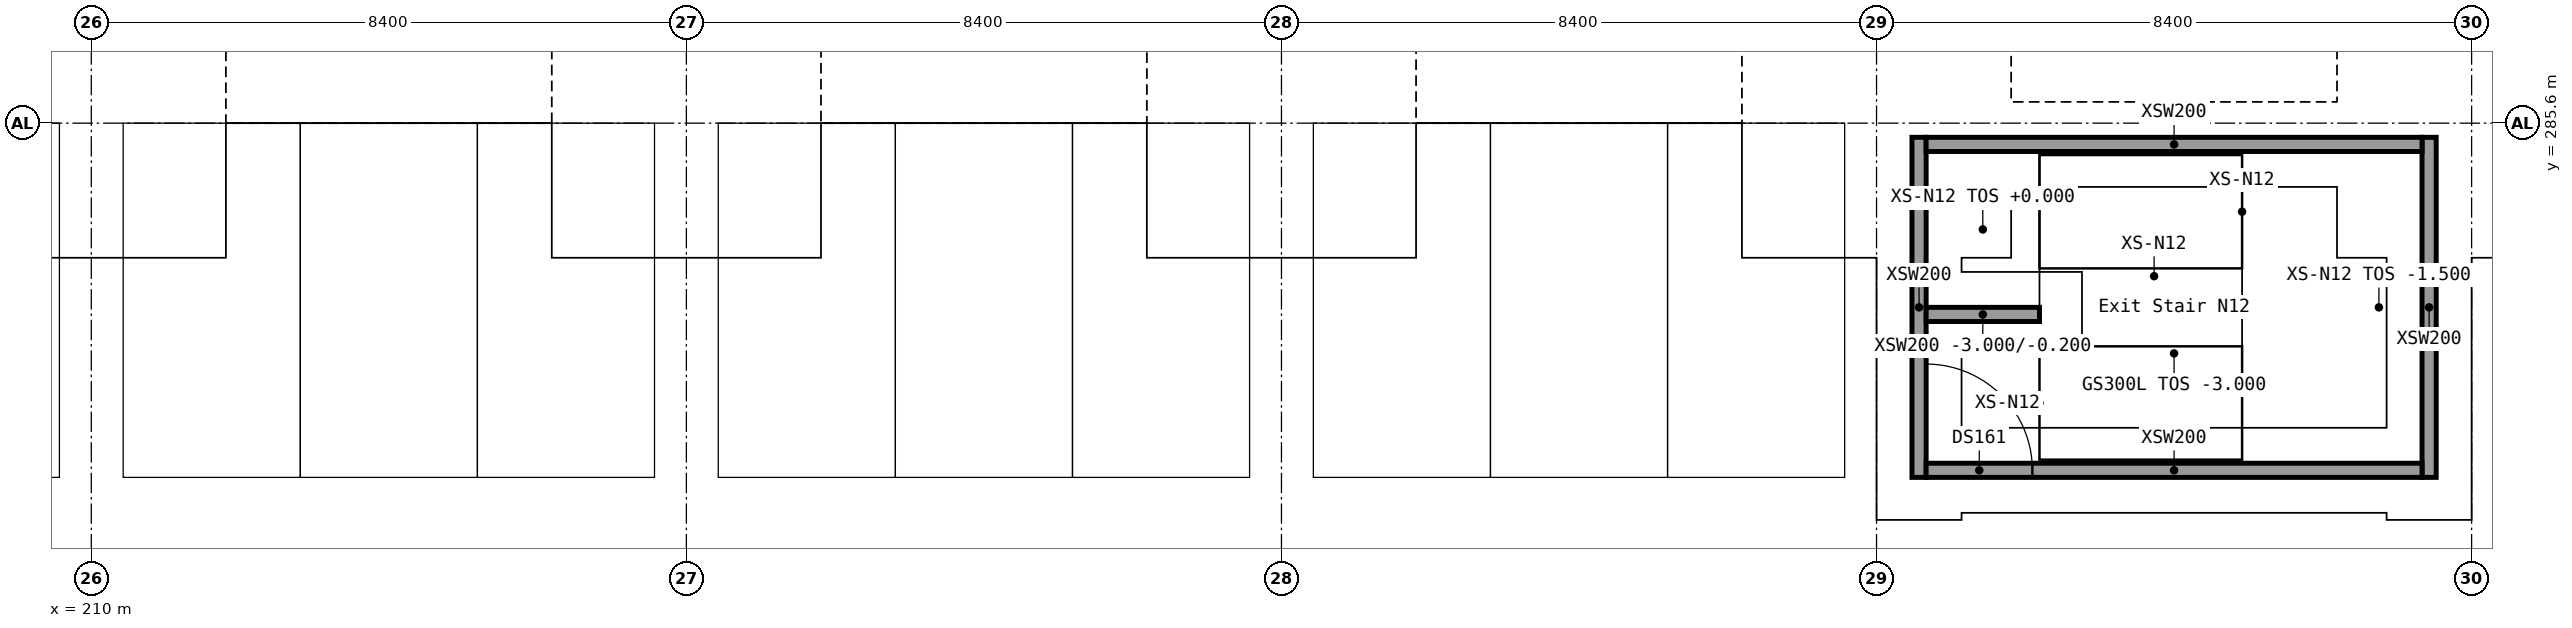
"""IFC4 building model, lengths in metres.
Left out: names, types, materials, properties, quantities, classifications, styles, units other than length and angle.
Written with IfcOpenShell. Run it as: python <this file> out.ifc"""

import sys

from ifc_helpers import new_model, si_unit, direction, frame, frame_2d, origin, origin_2d, place, context, subcontext, project, spatial, rectangle, extrude, element, fill, save


model = new_model("IFC4")
c1 = context("Model", 3, precision=1e-05, world=origin(), true_north=direction((0.0, 1.0)))
c2 = subcontext(c1, "Body", "Model", "MODEL_VIEW")
j1 = project(units=[si_unit("LENGTHUNIT", "METRE"), si_unit("PLANEANGLEUNIT", "RADIAN")], contexts=[c1])
p1 = place(None, origin())
s1 = spatial("IfcSite", under=j1, at=p1, CompositionType="ELEMENT")
p2 = place(p1, origin())
s2 = spatial("IfcBuilding", under=s1, at=p2, CompositionType="ELEMENT")
p3 = place(p2, frame((0.0, 0.0, -3.0)))
s3 = spatial("IfcBuildingStorey", under=s2, at=p3, CompositionType="ELEMENT", Elevation=-3.0)
for number, where, z_axis, x_axis in (
    (1, (235.8, 280.6, 0.0), (0.0, 0.0, 1.0), (0.0, 1.0, 0.0)),
    (2, (243.0, 280.6, 0.0), (0.0, 0.0, 1.0), (0.0, 1.0, 0.0)),
):
    element("IfcWall", number, at=place(p3, frame(where, z_axis=z_axis, x_axis=x_axis)), inside=s3, PredefinedType="SOLIDWALL", context=c2, shape_type="SweptSolid", body=[
        extrude(rectangle(XDim=4.8, YDim=0.2, at=frame_2d((2.4, 0.0))), origin(), (0.0, 0.0, 1.0), 3.0),
    ])
p4 = place(p3, frame((235.9, 280.7, 0.0), z_axis=(0.0, 0.0, 1.0), x_axis=(1.0, 0.0, 0.0)))
e3 = element("IfcWall", 3, at=p4, inside=s3, PredefinedType="SOLIDWALL", context=c2, shape_type="SweptSolid", body=[
    extrude(rectangle(XDim=7.0, YDim=0.2, at=frame_2d((3.5, 0.0))), origin(), (0.0, 0.0, 1.0), 3.0),
])
p5 = place(p4, origin())
e4 = element("IfcOpeningElement", 4, at=p5, cuts=e3, PredefinedType="OPENING", context=c2, shape_type="SweptSolid", body=[
    extrude(rectangle(XDim=1.5, YDim=2.1, at=frame_2d((0.75, 1.05))), frame((0.0, 0.1, 0.0), z_axis=(0.0, -1.0, 0.0), x_axis=(1.0, 0.0, 0.0)), (0.0, 0.0, 1.0), 0.2),
])
p6 = place(p3, frame((235.9, 285.3, 0.0), z_axis=(0.0, 0.0, 1.0), x_axis=(1.0, 0.0, 0.0)))
e5 = element("IfcWall", 5, at=p6, inside=s3, PredefinedType="SOLIDWALL", context=c2, shape_type="SweptSolid", body=[
    extrude(rectangle(XDim=7.0, YDim=0.2, at=frame_2d((3.5, 0.0))), origin(), (0.0, 0.0, 1.0), 3.0),
])
p7 = place(p3, frame((235.9, 282.9, 0.0), z_axis=(0.0, 0.0, 1.0), x_axis=(1.0, 0.0, 0.0)))
e6 = element("IfcWall", 6, at=p7, inside=s3, PredefinedType="SOLIDWALL", context=c2, shape_type="SweptSolid", body=[
    extrude(rectangle(XDim=1.6, YDim=0.2, at=frame_2d((0.8, 0.0))), origin(), (0.0, 0.0, 1.0), 2.8),
])
for number, where, z_axis, x_axis in (
    (7, (210.0, 285.6, 0.0), (0.0, 0.0, 1.0), (1.0, 0.0, 0.0)),
    (8, (218.4, 285.6, 0.0), (0.0, 0.0, 1.0), (1.0, 0.0, 0.0)),
    (9, (226.8, 285.6, 0.0), (0.0, 0.0, 1.0), (1.0, 0.0, 0.0)),
    (10, (235.2, 285.6, 0.0), (0.0, 0.0, 1.0), (1.0, 0.0, 0.0)),
    (11, (243.6, 285.6, 0.0), (0.0, 0.0, 1.0), (1.0, 0.0, 0.0)),
):
    element("IfcColumn", number, at=place(p3, frame(where, z_axis=z_axis, x_axis=x_axis)), inside=s3, PredefinedType="COLUMN", context=c2, shape_type="SweptSolid", body=[
        extrude(rectangle(XDim=0.8, YDim=0.8, at=origin_2d()), origin(), (0.0, 0.0, 1.0), 2.4),
    ])
p8 = place(p5, origin())
e12 = element("IfcDoor", 12, at=p8, inside=s3, OperationType="SINGLE_SWING_LEFT", PredefinedType="DOOR", context=c2, shape_type="SweptSolid", body=[
    extrude(rectangle(XDim=1.5, YDim=2.1, at=frame_2d((0.75, 1.05))), frame((0.0, 0.025, 0.0), z_axis=(0.0, -1.0, 0.0), x_axis=(1.0, 0.0, 0.0)), (0.0, 0.0, 1.0), 0.05),
])
fill(e4, e12)
save(model, sys.argv[1])
